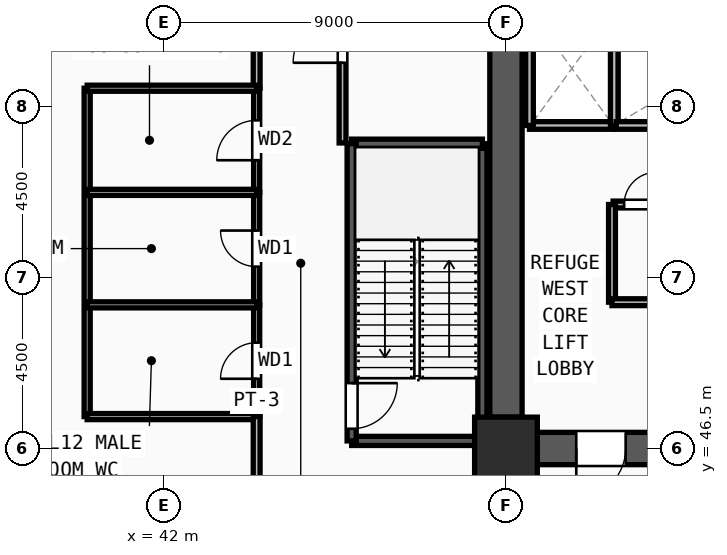
"""IFC4 building model, lengths in metres.
Left out: names, types, materials, properties, quantities, classifications, styles, units other than length and angle.
Written with IfcOpenShell. Run it as: python <this file> out.ifc"""

import sys

from ifc_helpers import new_model, si_unit, direction, frame, frame_2d, origin, origin_2d, place, context, subcontext, project, spatial, rectangle, extrude, source, transform, mapped, element, fill, save


model = new_model("IFC4")
c1 = context("Model", 3, precision=1e-05, world=origin(), true_north=direction((0.0, 1.0)))
c2 = subcontext(c1, "Body", "Model", "MODEL_VIEW")
j1 = project(units=[si_unit("LENGTHUNIT", "METRE"), si_unit("PLANEANGLEUNIT", "RADIAN")], contexts=[c1])
p1 = place(None, origin())
s1 = spatial("IfcSite", under=j1, at=p1, CompositionType="ELEMENT")
p2 = place(p1, origin())
s2 = spatial("IfcBuilding", under=s1, at=p2, CompositionType="ELEMENT")
p3 = place(p2, frame((0.0, 0.0, 47.25)))
s3 = spatial("IfcBuildingStorey", under=s2, at=p3, CompositionType="ELEMENT", Elevation=47.25)
m1 = source(origin(), c2, "Body", "SweptSolid", [
    extrude(rectangle(XDim=1.65, YDim=1.65, at=origin_2d()), origin(), (0.0, 0.0, 1.0), 4.5),
])
p4 = place(p3, frame((51.0, 46.5, 0.0), z_axis=(0.0, 0.0, 1.0), x_axis=(1.0, 0.0, 0.0)))
e1 = element("IfcColumn", 1, at=p4, inside=s3, PredefinedType="COLUMN", context=c2, shape_type="MappedRepresentation", body=[
    mapped(m1, transform((0.0, 0.0, 0.0), x_axis=(1.0, 0.0, 0.0), y_axis=(0.0, 1.0, 0.0), z_axis=(0.0, 0.0, 1.0), scale=1.0)),
])
p5 = place(p3, frame((59.175, 46.5, 0.0), z_axis=(0.0, 0.0, 1.0), x_axis=(-1.0, 0.0, 0.0)))
e2 = element("IfcWall", 2, at=p5, inside=s3, PredefinedType="SHEAR", context=c2, shape_type="SweptSolid", body=[
    extrude(rectangle(XDim=7.35, YDim=0.85, at=frame_2d((3.675, 0.0))), origin(), (0.0, 0.0, 1.0), 4.32),
])
m2 = source(origin(), c2, "Body", "SweptSolid", [
    extrude(rectangle(XDim=1.3, YDim=2.2, at=frame_2d((0.65, 1.1))), frame((0.0, 0.435, 0.0), z_axis=(0.0, -1.0, 0.0), x_axis=(1.0, 0.0, 0.0)), (0.0, 0.0, 1.0), 0.87),
])
p6 = place(p5, frame((5.025, 0.0, 0.0)))
e3 = element("IfcOpeningElement", 3, at=p6, cuts=e2, PredefinedType="OPENING", context=c2, shape_type="MappedRepresentation", body=[
    mapped(m2, transform((0.0, 0.0, 0.0), x_axis=(1.0, 0.0, 0.0), y_axis=(0.0, 1.0, 0.0), z_axis=(0.0, 0.0, 1.0), scale=1.0)),
])
m3 = source(origin(), c2, "Body", "SweptSolid", [
    extrude(rectangle(XDim=1.0, YDim=2.2, at=frame_2d((0.5, 1.1))), frame((0.0, 0.435, 0.0), z_axis=(0.0, -1.0, 0.0), x_axis=(1.0, 0.0, 0.0)), (0.0, 0.0, 1.0), 0.87),
])
p7 = place(p5, frame((0.525, 0.0, 0.0)))
e4 = element("IfcOpeningElement", 4, at=p7, cuts=e2, PredefinedType="OPENING", context=c2, shape_type="MappedRepresentation", body=[
    mapped(m3, transform((0.0, 0.0, 0.0), x_axis=(1.0, 0.0, 0.0), y_axis=(0.0, 1.0, 0.0), z_axis=(0.0, 0.0, 1.0), scale=1.0)),
])
p8 = place(p3, frame((51.0, 47.325, 0.0), z_axis=(0.0, 0.0, 1.0), x_axis=(0.0, 1.0, 0.0)))
e5 = element("IfcWall", 5, at=p8, inside=s3, PredefinedType="SHEAR", context=c2, shape_type="SweptSolid", body=[
    extrude(rectangle(XDim=13.35, YDim=0.85, at=frame_2d((6.675, 0.0))), origin(), (0.0, 0.0, 1.0), 4.32),
])
p9 = place(p3, frame((46.94, 46.7, 0.0), z_axis=(0.0, 0.0, 1.0), x_axis=(1.0, 0.0, 0.0)))
e6 = element("IfcWall", 6, at=p9, inside=s3, PredefinedType="SOLIDWALL", context=c2, shape_type="SweptSolid", body=[
    extrude(rectangle(XDim=3.44, YDim=0.24, at=frame_2d((1.72, 0.0))), origin(), (0.0, 0.0, 1.0), 4.32),
])
p10 = place(p3, frame((50.38, 46.7, 0.0), z_axis=(0.0, 0.0, 1.0), x_axis=(0.0, 1.0, 0.0)))
e7 = element("IfcWall", 7, at=p10, inside=s3, PredefinedType="SOLIDWALL", context=c2, shape_type="SweptSolid", body=[
    extrude(rectangle(XDim=7.82, YDim=0.24, at=frame_2d((3.91, 0.0))), origin(), (0.0, 0.0, 1.0), 4.32),
])
p11 = place(p3, frame((50.38, 54.52, 0.0), z_axis=(0.0, 0.0, 1.0), x_axis=(-1.0, 0.0, 0.0)))
e8 = element("IfcWall", 8, at=p11, inside=s3, PredefinedType="SOLIDWALL", context=c2, shape_type="SweptSolid", body=[
    extrude(rectangle(XDim=3.44, YDim=0.24, at=frame_2d((1.72, 0.0))), origin(), (0.0, 0.0, 1.0), 4.32),
])
p12 = place(p3, frame((46.94, 54.52, 0.0), z_axis=(0.0, 0.0, 1.0), x_axis=(0.0, -1.0, 0.0)))
e9 = element("IfcWall", 9, at=p12, inside=s3, PredefinedType="SOLIDWALL", context=c2, shape_type="SweptSolid", body=[
    extrude(rectangle(XDim=7.82, YDim=0.24, at=frame_2d((3.91, 0.0))), origin(), (0.0, 0.0, 1.0), 4.32),
])
m4 = source(origin(), c2, "Body", "SweptSolid", [
    extrude(rectangle(XDim=1.2, YDim=2.2, at=frame_2d((0.6, 1.1))), frame((0.0, 0.13, 0.0), z_axis=(0.0, -1.0, 0.0), x_axis=(1.0, 0.0, 0.0)), (0.0, 0.0, 1.0), 0.26),
])
p13 = place(p12, frame((6.3, 0.0, 0.0)))
e10 = element("IfcOpeningElement", 10, at=p13, cuts=e9, PredefinedType="OPENING", context=c2, shape_type="MappedRepresentation", body=[
    mapped(m4, transform((0.0, 0.0, 0.0), x_axis=(1.0, 0.0, 0.0), y_axis=(0.0, 1.0, 0.0), z_axis=(0.0, 0.0, 1.0), scale=1.0)),
])
p14 = place(p3, frame((51.62, 55.0, 0.0), z_axis=(0.0, 0.0, 1.0), x_axis=(1.0, 0.0, 0.0)))
e11 = element("IfcWall", 11, at=p14, inside=s3, PredefinedType="SOLIDWALL", context=c2, shape_type="SweptSolid", body=[
    extrude(rectangle(XDim=2.23, YDim=0.2, at=frame_2d((1.115, 0.0))), origin(), (0.0, 0.0, 1.0), 4.32),
])
for number, where, z_axis, x_axis in (
    (12, (53.85, 55.0, 0.0), (0.0, 0.0, 1.0), (0.0, 1.0, 0.0)),
    (13, (51.62, 58.0, 0.0), (0.0, 0.0, 1.0), (0.0, -1.0, 0.0)),
):
    element("IfcWall", number, at=place(p3, frame(where, z_axis=z_axis, x_axis=x_axis)), inside=s3, PredefinedType="SOLIDWALL", context=c2, shape_type="SweptSolid", body=[
        extrude(rectangle(XDim=3.0, YDim=0.2, at=frame_2d((1.5, 0.0))), origin(), (0.0, 0.0, 1.0), 4.32),
    ])
p15 = place(p3, frame((53.9, 55.0, 0.0), z_axis=(0.0, 0.0, 1.0), x_axis=(1.0, 0.0, 0.0)))
e14 = element("IfcWall", 14, at=p15, inside=s3, PredefinedType="SOLIDWALL", context=c2, shape_type="SweptSolid", body=[
    extrude(rectangle(XDim=2.3, YDim=0.2, at=frame_2d((1.15, 0.0))), origin(), (0.0, 0.0, 1.0), 4.32),
])
p16 = place(p3, frame((53.82, 52.92, 0.0), z_axis=(0.0, 0.0, 1.0), x_axis=(1.0, 0.0, 0.0)))
e15 = element("IfcWall", 15, at=p16, inside=s3, PredefinedType="PARTITIONING", context=c2, shape_type="SweptSolid", body=[
    extrude(rectangle(XDim=1.43, YDim=0.18, at=frame_2d((0.715, 0.0))), origin(), (0.0, 0.0, 1.0), 4.32),
])
m5 = source(origin(), c2, "Body", "SweptSolid", [
    extrude(rectangle(XDim=0.85, YDim=2.1, at=frame_2d((0.425, 1.05))), frame((0.0, 0.1, 0.0), z_axis=(0.0, -1.0, 0.0), x_axis=(1.0, 0.0, 0.0)), (0.0, 0.0, 1.0), 0.2),
])
p17 = place(p16, frame((0.29, 0.0, 0.0)))
e16 = element("IfcOpeningElement", 16, at=p17, cuts=e15, PredefinedType="OPENING", context=c2, shape_type="MappedRepresentation", body=[
    mapped(m5, transform((0.0, 0.0, 0.0), x_axis=(1.0, 0.0, 0.0), y_axis=(0.0, 1.0, 0.0), z_axis=(0.0, 0.0, 1.0), scale=1.0)),
])
p18 = place(p3, frame((44.44, 47.34, 0.0), z_axis=(0.0, 0.0, 1.0), x_axis=(0.0, 1.0, 0.0)))
e17 = element("IfcWall", 17, at=p18, inside=s3, PredefinedType="PARTITIONING", context=c2, shape_type="SweptSolid", body=[
    extrude(rectangle(XDim=2.94, YDim=0.16, at=frame_2d((1.47, 0.0))), origin(), (0.0, 0.0, 1.0), 4.32),
])
m6 = source(origin(), c2, "Body", "SweptSolid", [
    extrude(rectangle(XDim=0.95, YDim=2.15, at=frame_2d((0.475, 1.075))), frame((0.0, 0.09, 0.0), z_axis=(0.0, -1.0, 0.0), x_axis=(1.0, 0.0, 0.0)), (0.0, 0.0, 1.0), 0.18),
])
p19 = place(p18, frame((0.995, 0.0, 0.0)))
e18 = element("IfcOpeningElement", 18, at=p19, cuts=e17, PredefinedType="OPENING", context=c2, shape_type="MappedRepresentation", body=[
    mapped(m6, transform((0.0, 0.0, 0.0), x_axis=(1.0, 0.0, 0.0), y_axis=(0.0, 1.0, 0.0), z_axis=(0.0, 0.0, 1.0), scale=1.0)),
])
p20 = place(p3, frame((44.44, 50.28, 0.0), z_axis=(0.0, 0.0, 1.0), x_axis=(0.0, 1.0, 0.0)))
e19 = element("IfcWall", 19, at=p20, inside=s3, PredefinedType="PARTITIONING", context=c2, shape_type="SweptSolid", body=[
    extrude(rectangle(XDim=2.96, YDim=0.16, at=frame_2d((1.48, 0.0))), origin(), (0.0, 0.0, 1.0), 4.32),
])
p21 = place(p20, frame((1.005, 0.0, 0.0)))
e20 = element("IfcOpeningElement", 20, at=p21, cuts=e19, PredefinedType="OPENING", context=c2, shape_type="MappedRepresentation", body=[
    mapped(m6, transform((0.0, 0.0, 0.0), x_axis=(1.0, 0.0, 0.0), y_axis=(0.0, 1.0, 0.0), z_axis=(0.0, 0.0, 1.0), scale=1.0)),
])
p22 = place(p3, frame((44.44, 53.24, 0.0), z_axis=(0.0, 0.0, 1.0), x_axis=(0.0, 1.0, 0.0)))
e21 = element("IfcWall", 21, at=p22, inside=s3, PredefinedType="PARTITIONING", context=c2, shape_type="SweptSolid", body=[
    extrude(rectangle(XDim=2.74, YDim=0.16, at=frame_2d((1.37, 0.0))), origin(), (0.0, 0.0, 1.0), 4.32),
])
m7 = source(origin(), c2, "Body", "SweptSolid", [
    extrude(rectangle(XDim=1.05, YDim=2.15, at=frame_2d((0.525, 1.075))), frame((0.0, 0.09, 0.0), z_axis=(0.0, -1.0, 0.0), x_axis=(1.0, 0.0, 0.0)), (0.0, 0.0, 1.0), 0.18),
])
p23 = place(p22, frame((0.845, 0.0, 0.0)))
e22 = element("IfcOpeningElement", 22, at=p23, cuts=e21, PredefinedType="OPENING", context=c2, shape_type="MappedRepresentation", body=[
    mapped(m7, transform((0.0, 0.0, 0.0), x_axis=(1.0, 0.0, 0.0), y_axis=(0.0, 1.0, 0.0), z_axis=(0.0, 0.0, 1.0), scale=1.0)),
])
p24 = place(p3, frame((46.7, 54.54, 0.0), z_axis=(0.0, 0.0, 1.0), x_axis=(0.0, 1.0, 0.0)))
e23 = element("IfcWall", 23, at=p24, inside=s3, PredefinedType="PARTITIONING", context=c2, shape_type="SweptSolid", body=[
    extrude(rectangle(XDim=5.52, YDim=0.18, at=frame_2d((2.76, 0.0))), origin(), (0.0, 0.0, 1.0), 4.32),
])
m8 = source(origin(), c2, "Body", "SweptSolid", [
    extrude(rectangle(XDim=1.3, YDim=2.2, at=frame_2d((0.65, 1.1))), frame((0.0, 0.1, 0.0), z_axis=(0.0, -1.0, 0.0), x_axis=(1.0, 0.0, 0.0)), (0.0, 0.0, 1.0), 0.2),
])
p25 = place(p24, frame((2.11, 0.0, 0.0)))
e24 = element("IfcOpeningElement", 24, at=p25, cuts=e23, PredefinedType="OPENING", context=c2, shape_type="MappedRepresentation", body=[
    mapped(m8, transform((0.0, 0.0, 0.0), x_axis=(1.0, 0.0, 0.0), y_axis=(0.0, 1.0, 0.0), z_axis=(0.0, 0.0, 1.0), scale=1.0)),
])
p26 = place(p3, frame((44.44, 55.98, 0.0), z_axis=(0.0, 0.0, 1.0), x_axis=(0.0, 1.0, 0.0)))
e25 = element("IfcWall", 25, at=p26, inside=s3, PredefinedType="PARTITIONING", context=c2, shape_type="SweptSolid", body=[
    extrude(rectangle(XDim=11.035, YDim=0.18, at=frame_2d((5.518, 0.0))), origin(), (0.0, 0.0, 1.0), 4.32),
])
m9 = source(origin(), c2, "Body", "SweptSolid", [
    extrude(rectangle(XDim=1.4, YDim=2.25, at=frame_2d((0.7, 1.125))), frame((0.0, 0.1, 0.0), z_axis=(0.0, -1.0, 0.0), x_axis=(1.0, 0.0, 0.0)), (0.0, 0.0, 1.0), 0.2),
])
p27 = place(p26, frame((4.818, 0.0, 0.0)))
e26 = element("IfcOpeningElement", 26, at=p27, cuts=e25, PredefinedType="OPENING", context=c2, shape_type="MappedRepresentation", body=[
    mapped(m9, transform((0.0, 0.0, 0.0), x_axis=(1.0, 0.0, 0.0), y_axis=(0.0, 1.0, 0.0), z_axis=(0.0, 0.0, 1.0), scale=1.0)),
])
p28 = place(p3, frame((53.79, 50.35, 0.0), z_axis=(0.0, 0.0, 1.0), x_axis=(0.0, 1.0, 0.0)))
e27 = element("IfcWall", 27, at=p28, inside=s3, PredefinedType="PARTITIONING", context=c2, shape_type="SweptSolid", body=[
    extrude(rectangle(XDim=2.57, YDim=0.18, at=frame_2d((1.285, 0.0))), origin(), (0.0, 0.0, 1.0), 4.32),
])
p29 = place(p3, frame((53.79, 50.35, 0.0), z_axis=(0.0, 0.0, 1.0), x_axis=(1.0, 0.0, 0.0)))
e28 = element("IfcWall", 28, at=p29, inside=s3, PredefinedType="PARTITIONING", context=c2, shape_type="SweptSolid", body=[
    extrude(rectangle(XDim=1.49, YDim=0.18, at=frame_2d((0.745, 0.0))), origin(), (0.0, 0.0, 1.0), 4.32),
])
p30 = place(p3, frame((39.98, 47.34, 0.0), z_axis=(0.0, 0.0, 1.0), x_axis=(0.0, 1.0, 0.0)))
e29 = element("IfcWall", 29, at=p30, inside=s3, PredefinedType="PARTITIONING", context=c2, shape_type="SweptSolid", body=[
    extrude(rectangle(XDim=8.64, YDim=0.16, at=frame_2d((4.32, 0.0))), origin(), (0.0, 0.0, 1.0), 4.32),
])
for number, where, z_axis, x_axis in (
    (30, (39.98, 47.34, 0.0), (0.0, 0.0, 1.0), (1.0, 0.0, 0.0)),
    (31, (39.98, 50.28, 0.0), (0.0, 0.0, 1.0), (1.0, 0.0, 0.0)),
    (32, (39.98, 53.24, 0.0), (0.0, 0.0, 1.0), (1.0, 0.0, 0.0)),
    (33, (39.98, 55.98, 0.0), (0.0, 0.0, 1.0), (1.0, 0.0, 0.0)),
):
    element("IfcWall", number, at=place(p3, frame(where, z_axis=z_axis, x_axis=x_axis)), inside=s3, PredefinedType="PARTITIONING", context=c2, shape_type="SweptSolid", body=[
        extrude(rectangle(XDim=4.46, YDim=0.16, at=frame_2d((2.23, 0.0))), origin(), (0.0, 0.0, 1.0), 4.32),
    ])
p31 = place(p3, frame((44.44, 44.585, 0.0), z_axis=(0.0, 0.0, 1.0), x_axis=(0.0, 1.0, 0.0)))
e34 = element("IfcWall", 34, at=p31, inside=s3, PredefinedType="PARTITIONING", context=c2, shape_type="SweptSolid", body=[
    extrude(rectangle(XDim=2.755, YDim=0.18, at=frame_2d((1.377, 0.0))), origin(), (0.0, 0.0, 1.0), 4.32),
])
m10 = source(origin(), c2, "Body", "SweptSolid", [
    extrude(rectangle(XDim=1.3, YDim=2.2, at=frame_2d((0.65, 1.1))), frame((0.0, 0.025, 0.0), z_axis=(0.0, -1.0, 0.0), x_axis=(1.0, 0.0, 0.0)), (0.0, 0.0, 1.0), 0.05),
])
p32 = place(p6, origin())
e35 = element("IfcDoor", 35, at=p32, inside=s3, OperationType="SINGLE_SWING_RIGHT", PredefinedType="DOOR", context=c2, shape_type="MappedRepresentation", body=[
    mapped(m10, transform((0.0, 0.0, 0.0), x_axis=(1.0, 0.0, 0.0), y_axis=(0.0, 1.0, 0.0), z_axis=(0.0, 0.0, 1.0), scale=1.0)),
])
fill(e3, e35)
m11 = source(origin(), c2, "Body", "SweptSolid", [
    extrude(rectangle(XDim=1.2, YDim=2.2, at=frame_2d((0.6, 1.1))), frame((0.0, 0.025, 0.0), z_axis=(0.0, -1.0, 0.0), x_axis=(1.0, 0.0, 0.0)), (0.0, 0.0, 1.0), 0.05),
])
p33 = place(p13, origin())
e36 = element("IfcDoor", 36, at=p33, inside=s3, OperationType="SINGLE_SWING_LEFT", PredefinedType="DOOR", context=c2, shape_type="MappedRepresentation", body=[
    mapped(m11, transform((0.0, 0.0, 0.0), x_axis=(1.0, 0.0, 0.0), y_axis=(0.0, 1.0, 0.0), z_axis=(0.0, 0.0, 1.0), scale=1.0)),
])
fill(e10, e36)
m12 = source(origin(), c2, "Body", "SweptSolid", [
    extrude(rectangle(XDim=0.85, YDim=2.1, at=frame_2d((0.425, 1.05))), frame((0.0, 0.025, 0.0), z_axis=(0.0, -1.0, 0.0), x_axis=(1.0, 0.0, 0.0)), (0.0, 0.0, 1.0), 0.05),
])
p34 = place(p17, origin())
e37 = element("IfcDoor", 37, at=p34, inside=s3, OperationType="SINGLE_SWING_RIGHT", PredefinedType="DOOR", context=c2, shape_type="MappedRepresentation", body=[
    mapped(m12, transform((0.0, 0.0, 0.0), x_axis=(1.0, 0.0, 0.0), y_axis=(0.0, 1.0, 0.0), z_axis=(0.0, 0.0, 1.0), scale=1.0)),
])
fill(e16, e37)
m13 = source(origin(), c2, "Body", "SweptSolid", [
    extrude(rectangle(XDim=0.95, YDim=2.15, at=frame_2d((0.475, 1.075))), frame((0.0, 0.025, 0.0), z_axis=(0.0, -1.0, 0.0), x_axis=(1.0, 0.0, 0.0)), (0.0, 0.0, 1.0), 0.05),
])
p35 = place(p19, origin())
e38 = element("IfcDoor", 38, at=p35, inside=s3, OperationType="SINGLE_SWING_LEFT", PredefinedType="DOOR", context=c2, shape_type="MappedRepresentation", body=[
    mapped(m13, transform((0.0, 0.0, 0.0), x_axis=(1.0, 0.0, 0.0), y_axis=(0.0, 1.0, 0.0), z_axis=(0.0, 0.0, 1.0), scale=1.0)),
])
fill(e18, e38)
p36 = place(p21, origin())
e39 = element("IfcDoor", 39, at=p36, inside=s3, OperationType="SINGLE_SWING_RIGHT", PredefinedType="DOOR", context=c2, shape_type="MappedRepresentation", body=[
    mapped(m13, transform((0.0, 0.0, 0.0), x_axis=(1.0, 0.0, 0.0), y_axis=(0.0, 1.0, 0.0), z_axis=(0.0, 0.0, 1.0), scale=1.0)),
])
fill(e20, e39)
m14 = source(origin(), c2, "Body", "SweptSolid", [
    extrude(rectangle(XDim=1.05, YDim=2.15, at=frame_2d((0.525, 1.075))), frame((0.0, 0.025, 0.0), z_axis=(0.0, -1.0, 0.0), x_axis=(1.0, 0.0, 0.0)), (0.0, 0.0, 1.0), 0.05),
])
p37 = place(p23, origin())
e40 = element("IfcDoor", 40, at=p37, inside=s3, OperationType="SINGLE_SWING_LEFT", PredefinedType="DOOR", context=c2, shape_type="MappedRepresentation", body=[
    mapped(m14, transform((0.0, 0.0, 0.0), x_axis=(1.0, 0.0, 0.0), y_axis=(0.0, 1.0, 0.0), z_axis=(0.0, 0.0, 1.0), scale=1.0)),
])
fill(e22, e40)
p38 = place(p25, origin())
e41 = element("IfcDoor", 41, at=p38, inside=s3, OperationType="SINGLE_SWING_LEFT", PredefinedType="DOOR", context=c2, shape_type="MappedRepresentation", body=[
    mapped(m10, transform((0.0, 0.0, 0.0), x_axis=(1.0, 0.0, 0.0), y_axis=(0.0, 1.0, 0.0), z_axis=(0.0, 0.0, 1.0), scale=1.0)),
])
fill(e24, e41)
save(model, sys.argv[1])
